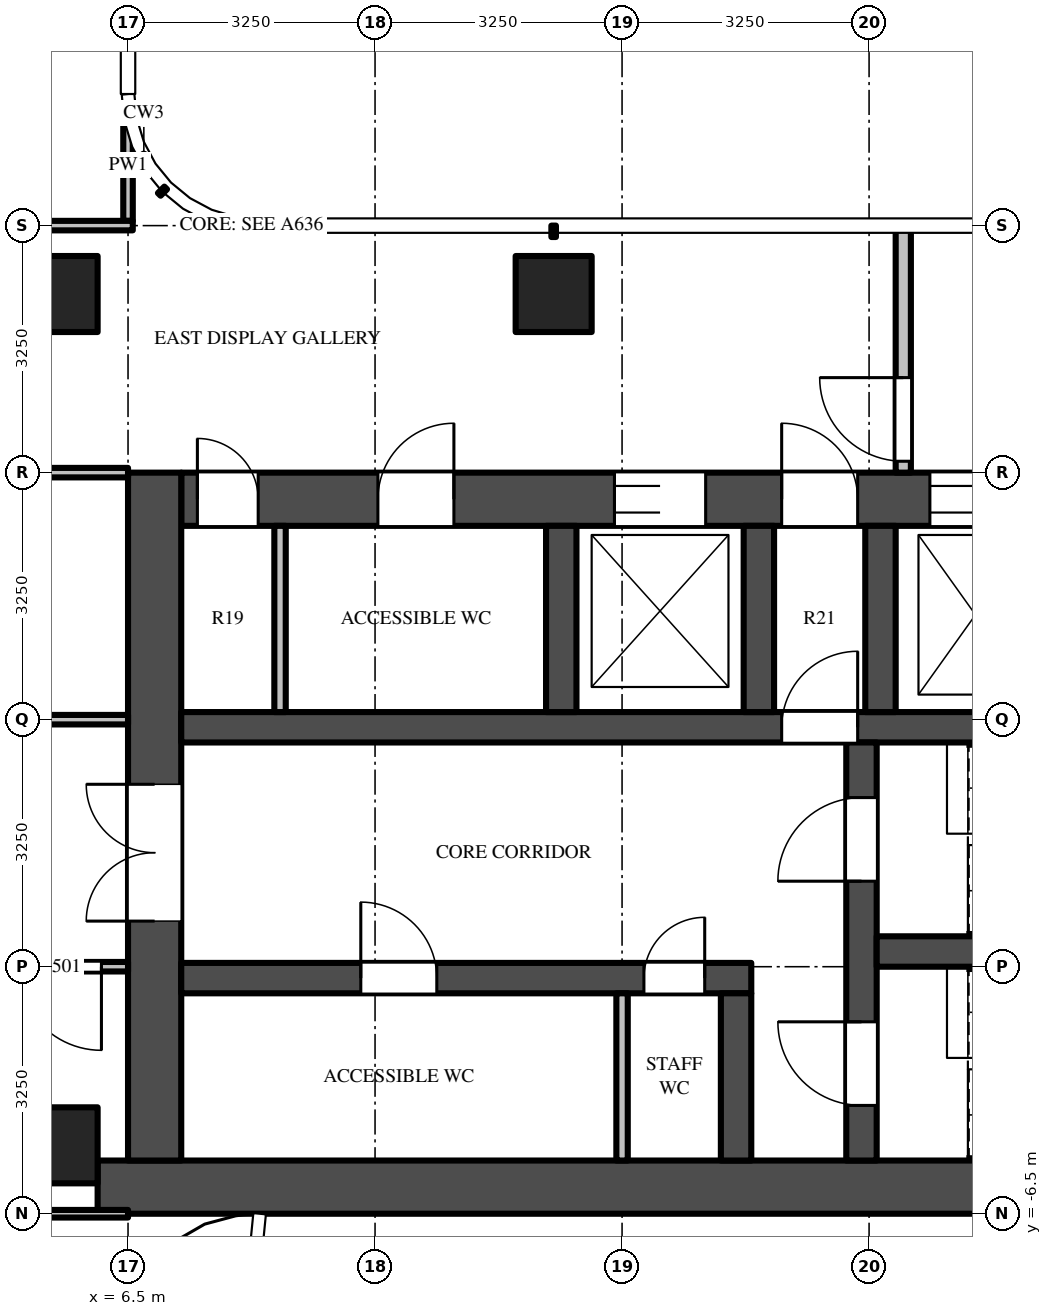
"""IFC4 building model, lengths in metres.
Left out: names, types, materials, properties, quantities, classifications, styles, units other than length and angle.
Written with IfcOpenShell. Run it as: python <this file> out.ifc"""

import sys

from ifc_helpers import new_model, si_unit, direction, frame, frame_2d, origin, origin_2d, place, context, subcontext, project, spatial, polyline, rectangle, outline, extrude, source, transform, mapped, element, fill, save


model = new_model("IFC4")
c1 = context("Model", 3, precision=1e-05, world=origin(), true_north=direction((0.0, 1.0)))
c2 = subcontext(c1, "Body", "Model", "MODEL_VIEW")
j1 = project(units=[si_unit("LENGTHUNIT", "METRE"), si_unit("PLANEANGLEUNIT", "RADIAN")], contexts=[c1])
p1 = place(None, origin())
s1 = spatial("IfcSite", under=j1, at=p1, CompositionType="ELEMENT")
p2 = place(p1, origin())
s2 = spatial("IfcBuilding", under=s1, at=p2, CompositionType="ELEMENT")
p3 = place(p2, frame((0.0, 0.0, 283.3)))
s3 = spatial("IfcBuildingStorey", under=s2, at=p3, CompositionType="ELEMENT", Elevation=283.3)
m1 = source(origin(), c2, "Body", "SweptSolid", [
    extrude(rectangle(XDim=1.0, YDim=1.0, at=origin_2d()), origin(), (0.0, 0.0, 1.0), 3.9),
])
for number, where, z_axis, x_axis in (
    (1, (12.1, 5.6, 0.0), (0.0, 0.0, 1.0), (1.0, 0.0, 0.0)),
    (2, (5.6, 5.6, 0.0), (0.0, 0.0, 1.0), (1.0, 0.0, 0.0)),
    (3, (5.6, -5.6, 0.0), (0.0, 0.0, 1.0), (1.0, 0.0, 0.0)),
):
    element("IfcColumn", number, at=place(p3, frame(where, z_axis=z_axis, x_axis=x_axis)), inside=s3, PredefinedType="COLUMN", context=c2, shape_type="MappedRepresentation", body=[
        mapped(m1, transform((0.0, 0.0, 0.0))),
    ])
m2 = source(origin(), c2, "Body", "SweptSolid", [
    extrude(rectangle(XDim=16.65, YDim=0.7, at=frame_2d((8.325, 0.0))), origin(), (0.0, 0.0, 1.0), 3.7),
])
p4 = place(p3, frame((6.1, -6.15, 0.0), z_axis=(0.0, 0.0, 1.0), x_axis=(1.0, 0.0, 0.0)))
e4 = element("IfcWall", 4, at=p4, inside=s3, PredefinedType="SHEAR", context=c2, shape_type="MappedRepresentation", body=[
    mapped(m2, transform((0.0, 0.0, 0.0))),
])
m3 = source(origin(), c2, "Body", "SweptSolid", [
    extrude(rectangle(XDim=14.85, YDim=0.7, at=frame_2d((7.425, 0.0))), origin(), (0.0, 0.0, 1.0), 3.7),
])
p5 = place(p3, frame((7.2, 2.9, 0.0), z_axis=(0.0, 0.0, 1.0), x_axis=(1.0, 0.0, 0.0)))
e5 = element("IfcWall", 5, at=p5, inside=s3, PredefinedType="SHEAR", context=c2, shape_type="MappedRepresentation", body=[
    mapped(m3, transform((0.0, 0.0, 0.0))),
])
m4 = source(origin(), c2, "Body", "SweptSolid", [
    extrude(rectangle(XDim=1.2, YDim=2.1, at=frame_2d((0.6, 1.05))), frame((0.0, 0.36, 0.0), z_axis=(0.0, -1.0, 0.0), x_axis=(1.0, 0.0, 0.0)), (0.0, 0.0, 1.0), 0.72),
])
p6 = place(p5, frame((5.7, 0.0, 0.0)))
e6 = element("IfcOpeningElement", 6, at=p6, cuts=e5, PredefinedType="OPENING", context=c2, shape_type="MappedRepresentation", body=[
    mapped(m4, transform((0.0, 0.0, 0.0))),
])
m5 = source(origin(), c2, "Body", "SweptSolid", [
    extrude(rectangle(XDim=1.3, YDim=2.1, at=frame_2d((0.65, 1.05))), frame((0.0, 0.36, 0.0), z_axis=(0.0, -1.0, 0.0), x_axis=(1.0, 0.0, 0.0)), (0.0, 0.0, 1.0), 0.72),
])
p7 = place(p5, frame((12.2, 0.0, 0.0)))
e7 = element("IfcOpeningElement", 7, at=p7, cuts=e5, PredefinedType="OPENING", context=c2, shape_type="MappedRepresentation", body=[
    mapped(m5, transform((0.0, 0.0, 0.0))),
])
p8 = place(p5, frame((9.85, 0.0, 0.0)))
e8 = element("IfcOpeningElement", 8, at=p8, cuts=e5, PredefinedType="OPENING", context=c2, shape_type="MappedRepresentation", body=[
    mapped(m4, transform((0.0, 0.0, 0.0))),
])
m6 = source(origin(), c2, "Body", "SweptSolid", [
    extrude(rectangle(XDim=1.0, YDim=2.1, at=frame_2d((0.5, 1.05))), frame((0.0, 0.36, 0.0), z_axis=(0.0, -1.0, 0.0), x_axis=(1.0, 0.0, 0.0)), (0.0, 0.0, 1.0), 0.72),
])
p9 = place(p5, frame((7.9, 0.0, 0.0)))
e9 = element("IfcOpeningElement", 9, at=p9, cuts=e5, PredefinedType="OPENING", context=c2, shape_type="MappedRepresentation", body=[
    mapped(m6, transform((0.0, 0.0, 0.0))),
])
m7 = source(origin(), c2, "Body", "SweptSolid", [
    extrude(rectangle(XDim=0.8, YDim=2.1, at=frame_2d((0.4, 1.05))), frame((0.0, 0.36, 0.0), z_axis=(0.0, -1.0, 0.0), x_axis=(1.0, 0.0, 0.0)), (0.0, 0.0, 1.0), 0.72),
])
p10 = place(p5, frame((0.212, 0.0, 0.0)))
e10 = element("IfcOpeningElement", 10, at=p10, cuts=e5, PredefinedType="OPENING", context=c2, shape_type="MappedRepresentation", body=[
    mapped(m7, transform((0.0, 0.0, 0.0))),
])
p11 = place(p5, frame((2.587, 0.0, 0.0)))
e11 = element("IfcOpeningElement", 11, at=p11, cuts=e5, PredefinedType="OPENING", context=c2, shape_type="MappedRepresentation", body=[
    mapped(m6, transform((0.0, 0.0, 0.0))),
])
m8 = source(origin(), c2, "Body", "SweptSolid", [
    extrude(rectangle(XDim=9.05, YDim=0.7, at=frame_2d((4.525, 0.0))), origin(), (0.0, 0.0, 1.0), 3.7),
])
p12 = place(p3, frame((6.85, -5.8, 0.0), z_axis=(0.0, 0.0, 1.0), x_axis=(0.0, 1.0, 0.0)))
e12 = element("IfcWall", 12, at=p12, inside=s3, PredefinedType="SHEAR", context=c2, shape_type="MappedRepresentation", body=[
    mapped(m8, transform((0.0, 0.0, 0.0))),
])
m9 = source(origin(), c2, "Body", "SweptSolid", [
    extrude(rectangle(XDim=1.8, YDim=2.1, at=frame_2d((0.9, 1.05))), frame((0.0, 0.36, 0.0), z_axis=(0.0, -1.0, 0.0), x_axis=(1.0, 0.0, 0.0)), (0.0, 0.0, 1.0), 0.72),
])
p13 = place(p12, frame((3.15, 0.0, 0.0)))
e13 = element("IfcOpeningElement", 13, at=p13, cuts=e12, PredefinedType="OPENING", context=c2, shape_type="MappedRepresentation", body=[
    mapped(m9, transform((0.0, 0.0, 0.0))),
])
m10 = source(origin(), c2, "Body", "SweptSolid", [
    extrude(rectangle(XDim=7.5, YDim=0.4, at=frame_2d((3.75, 0.0))), origin(), (0.0, 0.0, 1.0), 3.7),
])
p14 = place(p3, frame((7.2, -3.4, 0.0), z_axis=(0.0, 0.0, 1.0), x_axis=(1.0, 0.0, 0.0)))
e14 = element("IfcWall", 14, at=p14, inside=s3, PredefinedType="SHEAR", context=c2, shape_type="MappedRepresentation", body=[
    mapped(m10, transform((0.0, 0.0, 0.0))),
])
m11 = source(origin(), c2, "Body", "SweptSolid", [
    extrude(rectangle(XDim=1.0, YDim=2.1, at=frame_2d((0.5, 1.05))), frame((0.0, 0.21, 0.0), z_axis=(0.0, -1.0, 0.0), x_axis=(1.0, 0.0, 0.0)), (0.0, 0.0, 1.0), 0.42),
])
p15 = place(p14, frame((2.363, 0.0, 0.0)))
e15 = element("IfcOpeningElement", 15, at=p15, cuts=e14, PredefinedType="OPENING", context=c2, shape_type="MappedRepresentation", body=[
    mapped(m11, transform((0.0, 0.0, 0.0))),
])
m12 = source(origin(), c2, "Body", "SweptSolid", [
    extrude(rectangle(XDim=0.8, YDim=2.1, at=frame_2d((0.4, 1.05))), frame((0.0, 0.21, 0.0), z_axis=(0.0, -1.0, 0.0), x_axis=(1.0, 0.0, 0.0)), (0.0, 0.0, 1.0), 0.42),
])
p16 = place(p14, frame((6.087, 0.0, 0.0)))
e16 = element("IfcOpeningElement", 16, at=p16, cuts=e14, PredefinedType="OPENING", context=c2, shape_type="MappedRepresentation", body=[
    mapped(m12, transform((0.0, 0.0, 0.0))),
])
m13 = source(origin(), c2, "Body", "SweptSolid", [
    extrude(rectangle(XDim=14.85, YDim=0.4, at=frame_2d((7.425, 0.0))), origin(), (0.0, 0.0, 1.0), 3.7),
])
p17 = place(p3, frame((7.2, -0.1, 0.0), z_axis=(0.0, 0.0, 1.0), x_axis=(1.0, 0.0, 0.0)))
e17 = element("IfcWall", 17, at=p17, inside=s3, PredefinedType="SHEAR", context=c2, shape_type="MappedRepresentation", body=[
    mapped(m13, transform((0.0, 0.0, 0.0))),
])
p18 = place(p17, frame((7.9, 0.0, 0.0)))
e18 = element("IfcOpeningElement", 18, at=p18, cuts=e17, PredefinedType="OPENING", context=c2, shape_type="MappedRepresentation", body=[
    mapped(m11, transform((0.0, 0.0, 0.0))),
])
m14 = source(origin(), c2, "Body", "SweptSolid", [
    extrude(rectangle(XDim=5.5, YDim=0.4, at=frame_2d((2.75, 0.0))), origin(), (0.0, 0.0, 1.0), 3.7),
])
p19 = place(p3, frame((16.15, -5.8, 0.0), z_axis=(0.0, 0.0, 1.0), x_axis=(0.0, 1.0, 0.0)))
e19 = element("IfcWall", 19, at=p19, inside=s3, PredefinedType="SHEAR", context=c2, shape_type="MappedRepresentation", body=[
    mapped(m14, transform((0.0, 0.0, 0.0))),
])
m15 = source(origin(), c2, "Body", "SweptSolid", [
    extrude(rectangle(XDim=1.1, YDim=2.1, at=frame_2d((0.55, 1.05))), frame((0.0, 0.21, 0.0), z_axis=(0.0, -1.0, 0.0), x_axis=(1.0, 0.0, 0.0)), (0.0, 0.0, 1.0), 0.42),
])
p20 = place(p19, frame((0.725, 0.0, 0.0)))
e20 = element("IfcOpeningElement", 20, at=p20, cuts=e19, PredefinedType="OPENING", context=c2, shape_type="MappedRepresentation", body=[
    mapped(m15, transform((0.0, 0.0, 0.0))),
])
p21 = place(p19, frame((3.675, 0.0, 0.0)))
e21 = element("IfcOpeningElement", 21, at=p21, cuts=e19, PredefinedType="OPENING", context=c2, shape_type="MappedRepresentation", body=[
    mapped(m15, transform((0.0, 0.0, 0.0))),
])
m16 = source(origin(), c2, "Body", "SweptSolid", [
    extrude(rectangle(XDim=5.7, YDim=0.4, at=frame_2d((2.85, 0.0))), origin(), (0.0, 0.0, 1.0), 3.7),
])
p22 = place(p3, frame((16.35, -3.05, 0.0), z_axis=(0.0, 0.0, 1.0), x_axis=(1.0, 0.0, 0.0)))
e22 = element("IfcWall", 22, at=p22, inside=s3, PredefinedType="SHEAR", context=c2, shape_type="MappedRepresentation", body=[
    mapped(m16, transform((0.0, 0.0, 0.0))),
])
m17 = source(origin(), c2, "Body", "SweptSolid", [
    extrude(rectangle(XDim=2.2, YDim=0.4, at=frame_2d((1.1, 0.0))), origin(), (0.0, 0.0, 1.0), 3.7),
])
p23 = place(p3, frame((14.5, -5.8, 0.0), z_axis=(0.0, 0.0, 1.0), x_axis=(0.0, 1.0, 0.0)))
e23 = element("IfcWall", 23, at=p23, inside=s3, PredefinedType="SHEAR", context=c2, shape_type="MappedRepresentation", body=[
    mapped(m17, transform((0.0, 0.0, 0.0))),
])
m18 = source(origin(), c2, "Body", "SweptSolid", [
    extrude(rectangle(XDim=2.45, YDim=0.4, at=frame_2d((1.225, 0.0))), origin(), (0.0, 0.0, 1.0), 3.7),
])
for number, where, z_axis, x_axis in (
    (24, (12.2, 0.1, 0.0), (0.0, 0.0, 1.0), (0.0, 1.0, 0.0)),
    (25, (14.8, 0.1, 0.0), (0.0, 0.0, 1.0), (0.0, 1.0, 0.0)),
    (26, (16.4, 0.1, 0.0), (0.0, 0.0, 1.0), (0.0, 1.0, 0.0)),
):
    element("IfcWall", number, at=place(p3, frame(where, z_axis=z_axis, x_axis=x_axis)), inside=s3, PredefinedType="SHEAR", context=c2, shape_type="MappedRepresentation", body=[
        mapped(m18, transform((0.0, 0.0, 0.0))),
    ])
m19 = source(origin(), c2, "Body", "SweptSolid", [
    extrude(rectangle(XDim=3.25, YDim=0.2, at=frame_2d((1.625, 0.0))), origin(), (0.0, 0.0, 1.0), 3.7),
])
p24 = place(p3, frame((16.7, 3.25, 0.0), z_axis=(0.0, 0.0, 1.0), x_axis=(0.0, 1.0, 0.0)))
e27 = element("IfcWall", 27, at=p24, inside=s3, PredefinedType="PARTITIONING", context=c2, shape_type="MappedRepresentation", body=[
    mapped(m19, transform((0.0, 0.0, 0.0))),
])
m20 = source(origin(), c2, "Body", "SweptSolid", [
    extrude(rectangle(XDim=1.1, YDim=2.1, at=frame_2d((0.55, 1.05))), frame((0.0, 0.11, 0.0), z_axis=(0.0, -1.0, 0.0), x_axis=(1.0, 0.0, 0.0)), (0.0, 0.0, 1.0), 0.22),
])
p25 = place(p24, frame((0.15, 0.0, 0.0)))
e28 = element("IfcOpeningElement", 28, at=p25, cuts=e27, PredefinedType="OPENING", context=c2, shape_type="MappedRepresentation", body=[
    mapped(m20, transform((0.0, 0.0, 0.0))),
])
m21 = source(origin(), c2, "Body", "SweptSolid", [
    extrude(rectangle(XDim=2.2, YDim=0.15, at=frame_2d((1.1, 0.0))), origin(), (0.0, 0.0, 1.0), 3.7),
])
p26 = place(p3, frame((13.0, -5.8, 0.0), z_axis=(0.0, 0.0, 1.0), x_axis=(0.0, 1.0, 0.0)))
e29 = element("IfcWall", 29, at=p26, inside=s3, PredefinedType="PARTITIONING", context=c2, shape_type="MappedRepresentation", body=[
    mapped(m21, transform((0.0, 0.0, 0.0))),
])
m22 = source(origin(), c2, "Body", "SweptSolid", [
    extrude(rectangle(XDim=2.45, YDim=0.15, at=frame_2d((1.225, 0.0))), origin(), (0.0, 0.0, 1.0), 3.7),
])
p27 = place(p3, frame((8.5, 0.1, 0.0), z_axis=(0.0, 0.0, 1.0), x_axis=(0.0, 1.0, 0.0)))
e30 = element("IfcWall", 30, at=p27, inside=s3, PredefinedType="PARTITIONING", context=c2, shape_type="MappedRepresentation", body=[
    mapped(m22, transform((0.0, 0.0, 0.0))),
])
p28 = place(p3, origin())
e31 = element("IfcWall", 31, at=p28, inside=s3, PredefinedType="USERDEFINED", context=c2, shape_type="SweptSolid", body=[
    extrude(outline(polyline([(12.142, 8.876), (13.044, 8.876), (13.96, 8.715), (14.051, 8.685), (13.864, 8.115), (12.992, 8.276), (12.195, 8.276), (11.328, 8.115), (11.141, 8.685), (11.232, 8.715), (12.142, 8.876)])), origin(), (0.0, 0.0, 1.0), 0.5),
])
m23 = source(origin(), c2, "Body", "SweptSolid", [
    extrude(rectangle(XDim=1.469, YDim=0.125, at=frame_2d((0.734, 0.0))), origin(), (0.0, 0.0, 1.0), 3.7),
])
p29 = place(p3, frame((6.5, 6.562, 0.0), z_axis=(0.0, 0.0, 1.0), x_axis=(0.0, 1.0, 0.0)))
e32 = element("IfcWall", 32, at=p29, inside=s3, PredefinedType="PARTITIONING", context=c2, shape_type="MappedRepresentation", body=[
    mapped(m23, transform((0.0, 0.0, 0.0))),
])
m24 = source(origin(), c2, "Body", "SweptSolid", [
    extrude(rectangle(XDim=5.363, YDim=0.1, at=frame_2d((2.681, 0.0))), origin(), (0.0, 0.0, 1.0), 2.78),
])
p30 = place(p3, frame((1.137, -6.5, 0.0), z_axis=(0.0, 0.0, 1.0), x_axis=(1.0, 0.0, 0.0)))
e33 = element("IfcWall", 33, at=p30, inside=s3, PredefinedType="PARTITIONING", context=c2, shape_type="MappedRepresentation", body=[
    mapped(m24, transform((0.0, 0.0, 0.0))),
])
m25 = source(origin(), c2, "Body", "SweptSolid", [
    extrude(rectangle(XDim=5.363, YDim=0.125, at=frame_2d((2.681, 0.0))), origin(), (0.0, 0.0, 1.0), 2.997),
])
p31 = place(p3, frame((6.5, -3.25, 0.0), z_axis=(0.0, 0.0, 1.0), x_axis=(-1.0, 0.0, 0.0)))
e34 = element("IfcWall", 34, at=p31, inside=s3, PredefinedType="PARTITIONING", context=c2, shape_type="MappedRepresentation", body=[
    mapped(m25, transform((0.0, 0.0, 0.0))),
])
m26 = source(origin(), c2, "Body", "SweptSolid", [
    extrude(rectangle(XDim=1.1, YDim=2.1, at=frame_2d((0.55, 1.05))), frame((0.0, 0.073, 0.0), z_axis=(0.0, -1.0, 0.0), x_axis=(1.0, 0.0, 0.0)), (0.0, 0.0, 1.0), 0.145),
])
p32 = place(p31, frame((0.35, 0.0, 0.0)))
e35 = element("IfcOpeningElement", 35, at=p32, cuts=e34, PredefinedType="OPENING", context=c2, shape_type="MappedRepresentation", body=[
    mapped(m26, transform((0.0, 0.0, 0.0))),
])
p33 = place(p3, frame((6.5, 0.0, 0.0), z_axis=(0.0, 0.0, 1.0), x_axis=(-1.0, 0.0, 0.0)))
e36 = element("IfcWall", 36, at=p33, inside=s3, PredefinedType="PARTITIONING", context=c2, shape_type="MappedRepresentation", body=[
    mapped(m25, transform((0.0, 0.0, 0.0))),
])
m27 = source(origin(), c2, "Body", "SweptSolid", [
    extrude(rectangle(XDim=1.0, YDim=2.1, at=frame_2d((0.5, 1.05))), frame((0.0, 0.073, 0.0), z_axis=(0.0, -1.0, 0.0), x_axis=(1.0, 0.0, 0.0)), (0.0, 0.0, 1.0), 0.145),
])
p34 = place(p33, frame((3.95, 0.0, 0.0)))
e37 = element("IfcOpeningElement", 37, at=p34, cuts=e36, PredefinedType="OPENING", context=c2, shape_type="MappedRepresentation", body=[
    mapped(m27, transform((0.0, 0.0, 0.0))),
])
p35 = place(p3, frame((1.137, 3.25, 0.0), z_axis=(0.0, 0.0, 1.0), x_axis=(1.0, 0.0, 0.0)))
e38 = element("IfcWall", 38, at=p35, inside=s3, PredefinedType="PARTITIONING", context=c2, shape_type="MappedRepresentation", body=[
    mapped(m25, transform((0.0, 0.0, 0.0))),
])
m28 = source(origin(), c2, "Body", "SweptSolid", [
    extrude(rectangle(XDim=3.725, YDim=0.125, at=frame_2d((1.863, 0.0))), origin(), (0.0, 0.0, 1.0), 2.78),
])
p36 = place(p3, frame((2.837, 6.5, 0.0), z_axis=(0.0, 0.0, 1.0), x_axis=(1.0, 0.0, 0.0)))
e39 = element("IfcWall", 39, at=p36, inside=s3, PredefinedType="PARTITIONING", context=c2, shape_type="MappedRepresentation", body=[
    mapped(m28, transform((0.0, 0.0, 0.0))),
])
p37 = place(p36, frame((0.413, 0.0, 0.0)))
e40 = element("IfcOpeningElement", 40, at=p37, cuts=e39, PredefinedType="OPENING", context=c2, shape_type="MappedRepresentation", body=[
    mapped(m27, transform((0.0, 0.0, 0.0))),
])
m29 = source(origin(), c2, "Body", "SweptSolid", [
    extrude(rectangle(XDim=1.2, YDim=2.1, at=frame_2d((0.6, 1.05))), frame((0.0, -0.275, 0.0), z_axis=(0.0, -1.0, 0.0), x_axis=(1.0, 0.0, 0.0)), (0.0, 0.0, 1.0), 0.05),
])
p38 = place(p6, origin())
e41 = element("IfcDoor", 41, at=p38, inside=s3, OperationType="DOUBLE_DOOR_SLIDING", PredefinedType="DOOR", context=c2, shape_type="MappedRepresentation", body=[
    mapped(m29, transform((0.0, 0.0, 0.0))),
])
fill(e6, e41)
p39 = place(p8, origin())
e42 = element("IfcDoor", 42, at=p39, inside=s3, OperationType="DOUBLE_DOOR_SLIDING", PredefinedType="DOOR", context=c2, shape_type="MappedRepresentation", body=[
    mapped(m29, transform((0.0, 0.0, 0.0))),
])
fill(e8, e42)
m30 = source(origin(), c2, "Body", "SweptSolid", [
    extrude(rectangle(XDim=1.8, YDim=2.1, at=frame_2d((0.9, 1.05))), frame((0.0, -0.275, 0.0), z_axis=(0.0, -1.0, 0.0), x_axis=(1.0, 0.0, 0.0)), (0.0, 0.0, 1.0), 0.05),
])
p40 = place(p13, origin())
e43 = element("IfcDoor", 43, at=p40, inside=s3, OperationType="DOUBLE_DOOR_SINGLE_SWING", PredefinedType="DOOR", context=c2, shape_type="MappedRepresentation", body=[
    mapped(m30, transform((0.0, 0.0, 0.0))),
])
fill(e13, e43)
m31 = source(origin(), c2, "Body", "SweptSolid", [
    extrude(rectangle(XDim=1.1, YDim=2.1, at=frame_2d((0.55, 1.05))), frame((0.0, 0.025, 0.0), z_axis=(0.0, -1.0, 0.0), x_axis=(1.0, 0.0, 0.0)), (0.0, 0.0, 1.0), 0.05),
])
p41 = place(p20, origin())
e44 = element("IfcDoor", 44, at=p41, inside=s3, OperationType="SINGLE_SWING_RIGHT", PredefinedType="DOOR", context=c2, shape_type="MappedRepresentation", body=[
    mapped(m31, transform((0.0, 0.0, 0.0))),
])
fill(e20, e44)
p42 = place(p21, origin())
e45 = element("IfcDoor", 45, at=p42, inside=s3, OperationType="SINGLE_SWING_LEFT", PredefinedType="DOOR", context=c2, shape_type="MappedRepresentation", body=[
    mapped(m31, transform((0.0, 0.0, 0.0))),
])
fill(e21, e45)
m32 = source(origin(), c2, "Body", "SweptSolid", [
    extrude(rectangle(XDim=1.0, YDim=2.1, at=frame_2d((0.5, 1.05))), frame((0.0, 0.025, 0.0), z_axis=(0.0, -1.0, 0.0), x_axis=(1.0, 0.0, 0.0)), (0.0, 0.0, 1.0), 0.05),
])
p43 = place(p18, origin())
e46 = element("IfcDoor", 46, at=p43, inside=s3, OperationType="SINGLE_SWING_RIGHT", PredefinedType="DOOR", context=c2, shape_type="MappedRepresentation", body=[
    mapped(m32, transform((0.0, 0.0, 0.0))),
])
fill(e18, e46)
m33 = source(origin(), c2, "Body", "SweptSolid", [
    extrude(rectangle(XDim=1.0, YDim=2.1, at=frame_2d((0.5, 1.05))), frame((0.0, -0.275, 0.0), z_axis=(0.0, -1.0, 0.0), x_axis=(1.0, 0.0, 0.0)), (0.0, 0.0, 1.0), 0.05),
])
p44 = place(p9, origin())
e47 = element("IfcDoor", 47, at=p44, inside=s3, OperationType="SINGLE_SWING_LEFT", PredefinedType="DOOR", context=c2, shape_type="MappedRepresentation", body=[
    mapped(m33, transform((0.0, 0.0, 0.0))),
])
fill(e9, e47)
p45 = place(p25, origin())
e48 = element("IfcDoor", 48, at=p45, inside=s3, OperationType="SINGLE_SWING_RIGHT", PredefinedType="DOOR", context=c2, shape_type="MappedRepresentation", body=[
    mapped(m31, transform((0.0, 0.0, 0.0))),
])
fill(e28, e48)
p46 = place(p15, origin())
e49 = element("IfcDoor", 49, at=p46, inside=s3, OperationType="SINGLE_SWING_LEFT", PredefinedType="DOOR", context=c2, shape_type="MappedRepresentation", body=[
    mapped(m32, transform((0.0, 0.0, 0.0))),
])
fill(e15, e49)
m34 = source(origin(), c2, "Body", "SweptSolid", [
    extrude(rectangle(XDim=0.8, YDim=2.1, at=frame_2d((0.4, 1.05))), frame((0.0, 0.025, 0.0), z_axis=(0.0, -1.0, 0.0), x_axis=(1.0, 0.0, 0.0)), (0.0, 0.0, 1.0), 0.05),
])
p47 = place(p16, origin())
e50 = element("IfcDoor", 50, at=p47, inside=s3, OperationType="SINGLE_SWING_RIGHT", PredefinedType="DOOR", context=c2, shape_type="MappedRepresentation", body=[
    mapped(m34, transform((0.0, 0.0, 0.0))),
])
fill(e16, e50)
m35 = source(origin(), c2, "Body", "SweptSolid", [
    extrude(rectangle(XDim=0.8, YDim=2.1, at=frame_2d((0.4, 1.05))), frame((0.0, -0.275, 0.0), z_axis=(0.0, -1.0, 0.0), x_axis=(1.0, 0.0, 0.0)), (0.0, 0.0, 1.0), 0.05),
])
p48 = place(p10, origin())
e51 = element("IfcDoor", 51, at=p48, inside=s3, OperationType="SINGLE_SWING_LEFT", PredefinedType="DOOR", context=c2, shape_type="MappedRepresentation", body=[
    mapped(m35, transform((0.0, 0.0, 0.0))),
])
fill(e10, e51)
p49 = place(p11, origin())
e52 = element("IfcDoor", 52, at=p49, inside=s3, OperationType="SINGLE_SWING_RIGHT", PredefinedType="DOOR", context=c2, shape_type="MappedRepresentation", body=[
    mapped(m33, transform((0.0, 0.0, 0.0))),
])
fill(e11, e52)
p50 = place(p32, origin())
e53 = element("IfcDoor", 53, at=p50, inside=s3, OperationType="SINGLE_SWING_LEFT", PredefinedType="DOOR", context=c2, shape_type="MappedRepresentation", body=[
    mapped(m31, transform((0.0, 0.0, 0.0))),
])
fill(e35, e53)
save(model, sys.argv[1])
